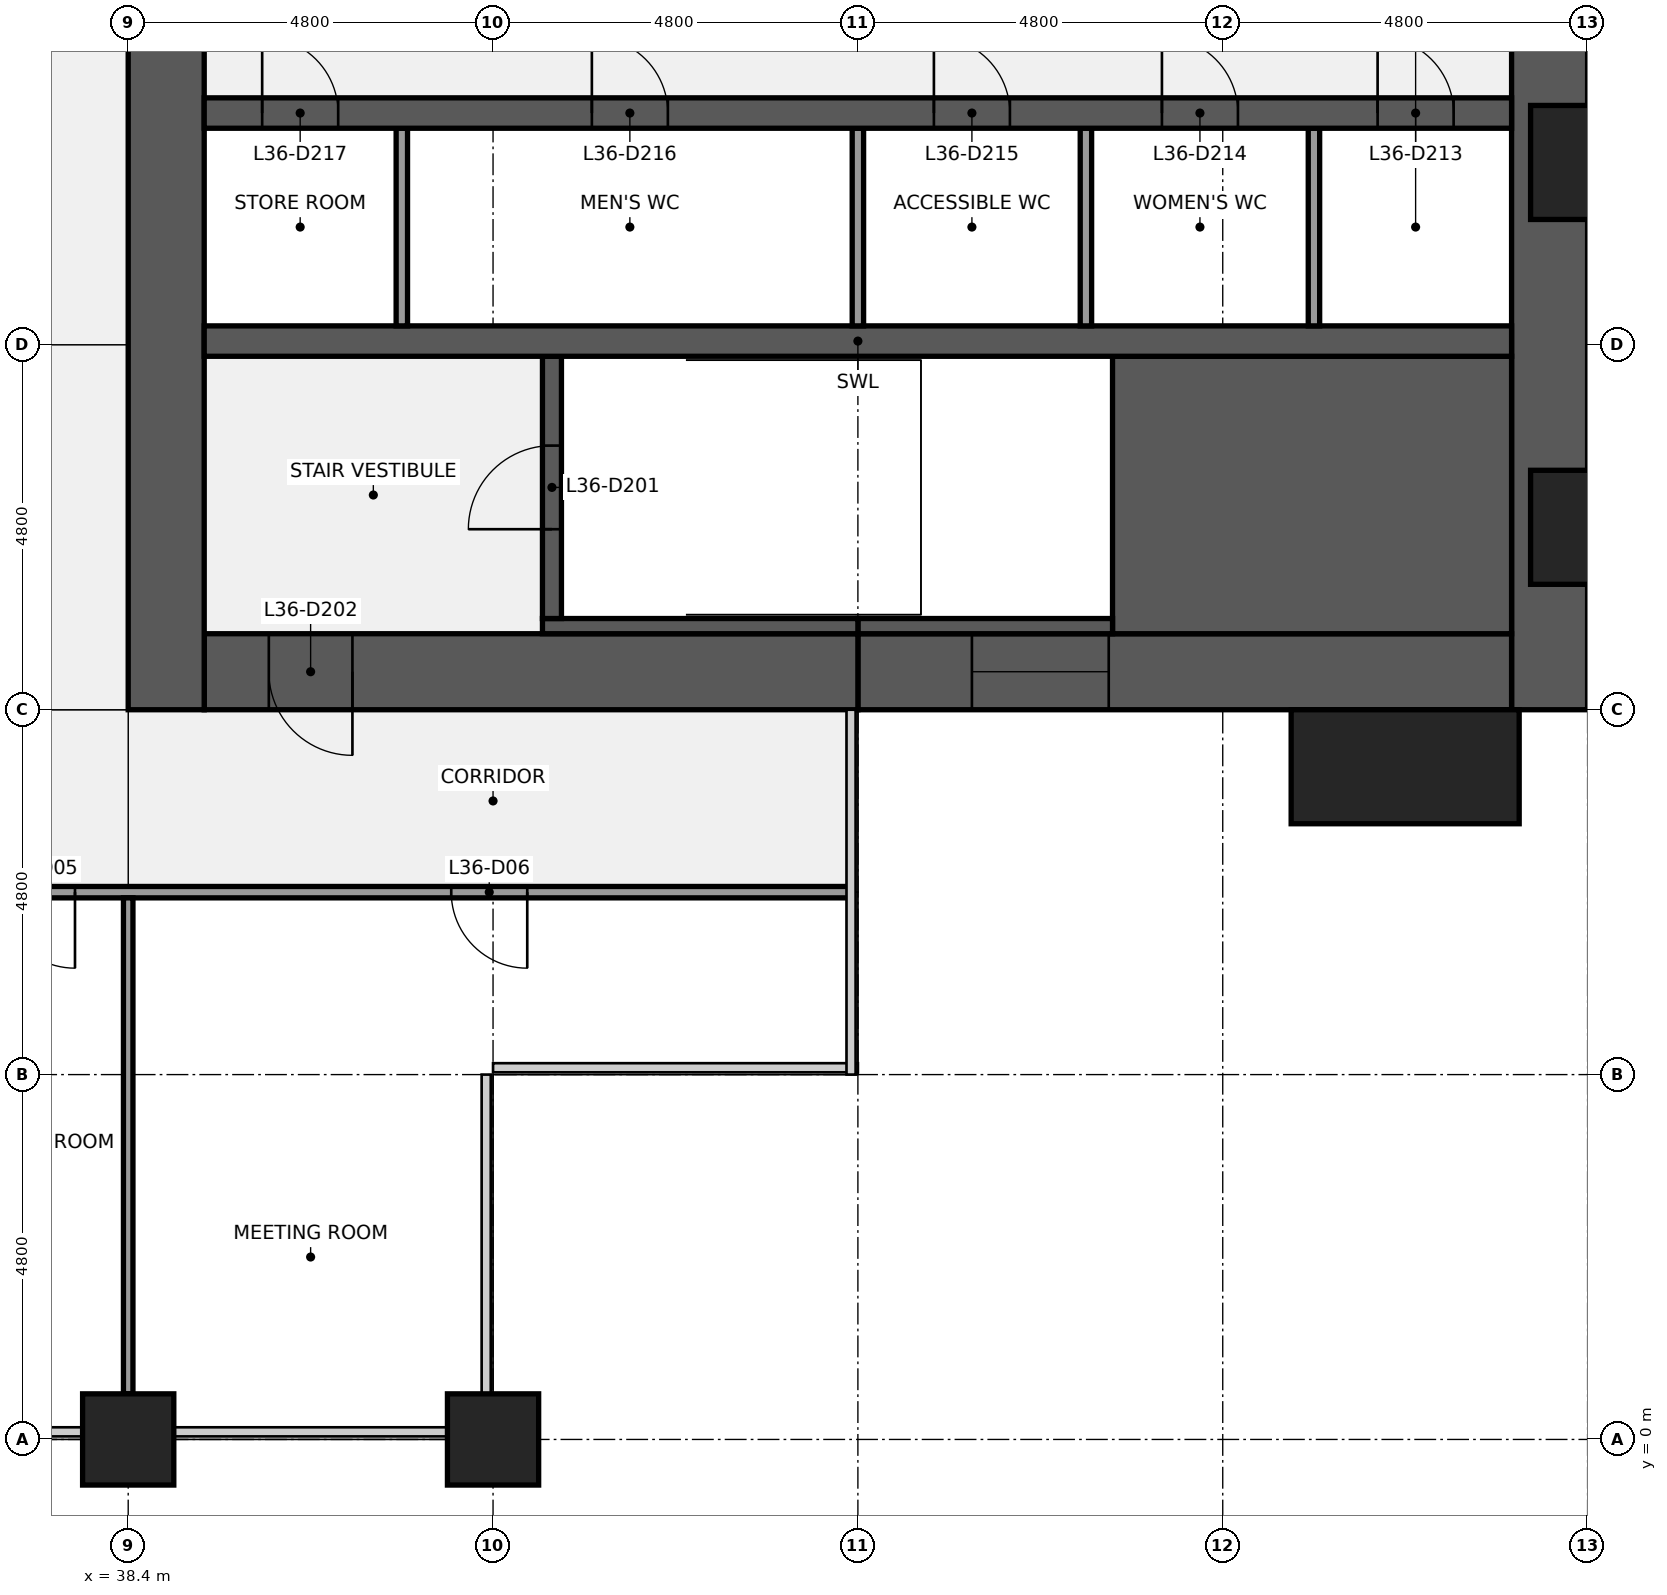
"""IFC4 building model, lengths in metres.
Left out: names, types, materials, properties, quantities, classifications, styles, units other than length and angle.
Written with IfcOpenShell. Run it as: python <this file> out.ifc"""

import sys

from ifc_helpers import new_model, si_unit, direction, frame, frame_2d, origin, origin_2d, place, context, subcontext, project, spatial, rectangle, extrude, element, fill, save


model = new_model("IFC4")
c1 = context("Model", 3, precision=1e-05, world=origin(), true_north=direction((0.0, 1.0)))
c2 = subcontext(c1, "Body", "Model", "MODEL_VIEW")
j1 = project(units=[si_unit("LENGTHUNIT", "METRE"), si_unit("PLANEANGLEUNIT", "RADIAN")], contexts=[c1])
p1 = place(None, origin())
s1 = spatial("IfcSite", under=j1, at=p1, CompositionType="ELEMENT")
p2 = place(p1, origin())
s2 = spatial("IfcBuilding", under=s1, at=p2, CompositionType="ELEMENT")
p3 = place(p2, frame((0.0, 0.0, 164.1)))
s3 = spatial("IfcBuildingStorey", under=s2, at=p3, CompositionType="ELEMENT", Elevation=164.1)
for number, where, z_axis, x_axis in (
    (1, (38.4, 0.0, 0.0), (0.0, 0.0, 1.0), (1.0, 0.0, 0.0)),
    (2, (43.2, 0.0, 0.0), (0.0, 0.0, 1.0), (1.0, 0.0, 0.0)),
):
    element("IfcColumn", number, at=place(p3, frame(where, z_axis=z_axis, x_axis=x_axis)), inside=s3, PredefinedType="COLUMN", context=c2, shape_type="SweptSolid", body=[
        extrude(rectangle(XDim=1.2, YDim=1.2, at=origin_2d()), origin(), (0.0, 0.0, 1.0), 4.0),
    ])
p4 = place(p3, frame((57.1, 38.4, 0.0), z_axis=(0.0, 0.0, 1.0), x_axis=(0.0, -1.0, 0.0)))
e3 = element("IfcWall", 3, at=p4, inside=s3, PredefinedType="SHEAR", context=c2, shape_type="SweptSolid", body=[
    extrude(rectangle(XDim=28.8, YDim=1.0, at=frame_2d((14.4, 0.0))), origin(), (0.0, 0.0, 1.0), 3.84),
])
p5 = place(p4, frame((18.45, 0.0, 0.9)))
e4 = element("IfcOpeningElement", 4, at=p5, cuts=e3, PredefinedType="OPENING", context=c2, shape_type="SweptSolid", body=[
    extrude(rectangle(XDim=1.5, YDim=1.5, at=frame_2d((0.75, 0.75))), frame((0.0, 0.51, 0.0), z_axis=(0.0, -1.0, 0.0), x_axis=(1.0, 0.0, 0.0)), (0.0, 0.0, 1.0), 1.02),
])
p6 = place(p4, frame((8.85, 0.0, 0.9)))
e5 = element("IfcOpeningElement", 5, at=p6, cuts=e3, PredefinedType="OPENING", context=c2, shape_type="SweptSolid", body=[
    extrude(rectangle(XDim=1.5, YDim=1.5, at=frame_2d((0.75, 0.75))), frame((0.0, 0.51, 0.0), z_axis=(0.0, -1.0, 0.0), x_axis=(1.0, 0.0, 0.0)), (0.0, 0.0, 1.0), 1.02),
])
p7 = place(p3, frame((56.6, 10.1, 0.0), z_axis=(0.0, 0.0, 1.0), x_axis=(-1.0, 0.0, 0.0)))
e6 = element("IfcWall", 6, at=p7, inside=s3, PredefinedType="SHEAR", context=c2, shape_type="SweptSolid", body=[
    extrude(rectangle(XDim=8.6, YDim=1.0, at=frame_2d((4.3, 0.0))), origin(), (0.0, 0.0, 1.0), 3.84),
])
p8 = place(p7, frame((5.3, 0.0, 0.9)))
e7 = element("IfcOpeningElement", 7, at=p8, cuts=e6, PredefinedType="OPENING", context=c2, shape_type="SweptSolid", body=[
    extrude(rectangle(XDim=1.8, YDim=1.5, at=frame_2d((0.9, 0.75))), frame((0.0, 0.51, 0.0), z_axis=(0.0, -1.0, 0.0), x_axis=(1.0, 0.0, 0.0)), (0.0, 0.0, 1.0), 1.02),
])
p9 = place(p3, frame((48.0, 10.1, 0.0), z_axis=(0.0, 0.0, 1.0), x_axis=(-1.0, 0.0, 0.0)))
e8 = element("IfcWall", 8, at=p9, inside=s3, PredefinedType="SHEAR", context=c2, shape_type="SweptSolid", body=[
    extrude(rectangle(XDim=8.6, YDim=1.0, at=frame_2d((4.3, 0.0))), origin(), (0.0, 0.0, 1.0), 3.84),
])
p10 = place(p9, frame((6.65, 0.0, 0.0)))
e9 = element("IfcOpeningElement", 9, at=p10, cuts=e8, PredefinedType="OPENING", context=c2, shape_type="SweptSolid", body=[
    extrude(rectangle(XDim=1.1, YDim=2.1, at=frame_2d((0.55, 1.05))), frame((0.0, 0.51, 0.0), z_axis=(0.0, -1.0, 0.0), x_axis=(1.0, 0.0, 0.0)), (0.0, 0.0, 1.0), 1.02),
])
p11 = place(p3, frame((38.9, 9.6, 0.0), z_axis=(0.0, 0.0, 1.0), x_axis=(0.0, 1.0, 0.0)))
e10 = element("IfcWall", 10, at=p11, inside=s3, PredefinedType="SHEAR", context=c2, shape_type="SweptSolid", body=[
    extrude(rectangle(XDim=28.8, YDim=1.0, at=frame_2d((14.4, 0.0))), origin(), (0.0, 0.0, 1.0), 3.84),
])
p12 = place(p11, frame((8.7, 0.0, 0.0)))
e11 = element("IfcOpeningElement", 11, at=p12, cuts=e10, PredefinedType="OPENING", context=c2, shape_type="SweptSolid", body=[
    extrude(rectangle(XDim=1.8, YDim=2.1, at=frame_2d((0.9, 1.05))), frame((0.0, 0.51, 0.0), z_axis=(0.0, -1.0, 0.0), x_axis=(1.0, 0.0, 0.0)), (0.0, 0.0, 1.0), 1.02),
])
p13 = place(p11, frame((18.3, 0.0, 0.0)))
e12 = element("IfcOpeningElement", 12, at=p13, cuts=e10, PredefinedType="OPENING", context=c2, shape_type="SweptSolid", body=[
    extrude(rectangle(XDim=1.8, YDim=2.1, at=frame_2d((0.9, 1.05))), frame((0.0, 0.51, 0.0), z_axis=(0.0, -1.0, 0.0), x_axis=(1.0, 0.0, 0.0)), (0.0, 0.0, 1.0), 1.02),
])
p14 = place(p3, frame((51.35, 12.425, 0.0), z_axis=(0.0, 0.0, 1.0), x_axis=(1.0, 0.0, 0.0)))
e13 = element("IfcWall", 13, at=p14, inside=s3, PredefinedType="SHEAR", context=c2, shape_type="SweptSolid", body=[
    extrude(rectangle(XDim=5.25, YDim=3.65, at=frame_2d((2.625, 0.0))), origin(), (0.0, 0.0, 1.0), 3.84),
])
p15 = place(p3, frame((48.0, 10.7, 0.0), z_axis=(0.0, 0.0, 1.0), x_axis=(1.0, 0.0, 0.0)))
e14 = element("IfcWall", 14, at=p15, inside=s3, PredefinedType="SHEAR", context=c2, shape_type="SweptSolid", body=[
    extrude(rectangle(XDim=3.35, YDim=0.2, at=frame_2d((1.675, 0.0))), origin(), (0.0, 0.0, 1.0), 3.84),
])
p16 = place(p3, frame((43.85, 10.7, 0.0), z_axis=(0.0, 0.0, 1.0), x_axis=(1.0, 0.0, 0.0)))
e15 = element("IfcWall", 15, at=p16, inside=s3, PredefinedType="SHEAR", context=c2, shape_type="SweptSolid", body=[
    extrude(rectangle(XDim=4.15, YDim=0.2, at=frame_2d((2.075, 0.0))), origin(), (0.0, 0.0, 1.0), 3.84),
])
p17 = place(p3, frame((43.975, 10.8, 0.0), z_axis=(0.0, 0.0, 1.0), x_axis=(0.0, 1.0, 0.0)))
e16 = element("IfcWall", 16, at=p17, inside=s3, PredefinedType="SHEAR", context=c2, shape_type="SweptSolid", body=[
    extrude(rectangle(XDim=3.45, YDim=0.25, at=frame_2d((1.725, 0.0))), origin(), (0.0, 0.0, 1.0), 3.84),
])
p18 = place(p17, frame((1.175, 0.0, 0.0)))
e17 = element("IfcOpeningElement", 17, at=p18, cuts=e16, PredefinedType="OPENING", context=c2, shape_type="SweptSolid", body=[
    extrude(rectangle(XDim=1.1, YDim=2.1, at=frame_2d((0.55, 1.05))), frame((0.0, 0.135, 0.0), z_axis=(0.0, -1.0, 0.0), x_axis=(1.0, 0.0, 0.0)), (0.0, 0.0, 1.0), 0.27),
])
p19 = place(p3, frame((39.4, 14.45, 0.0), z_axis=(0.0, 0.0, 1.0), x_axis=(1.0, 0.0, 0.0)))
e18 = element("IfcWall", 18, at=p19, inside=s3, PredefinedType="SHEAR", context=c2, shape_type="SweptSolid", body=[
    extrude(rectangle(XDim=17.2, YDim=0.4, at=frame_2d((8.6, 0.0))), origin(), (0.0, 0.0, 1.0), 3.84),
])
for number, where, z_axis, x_axis in (
    (19, (54.0, 14.65, 0.0), (0.0, 0.0, 1.0), (0.0, 1.0, 0.0)),
    (20, (51.0, 14.65, 0.0), (0.0, 0.0, 1.0), (0.0, 1.0, 0.0)),
    (21, (48.0, 14.65, 0.0), (0.0, 0.0, 1.0), (0.0, 1.0, 0.0)),
    (22, (42.0, 14.65, 0.0), (0.0, 0.0, 1.0), (0.0, 1.0, 0.0)),
):
    element("IfcWall", number, at=place(p3, frame(where, z_axis=z_axis, x_axis=x_axis)), inside=s3, PredefinedType="PARTITIONING", context=c2, shape_type="SweptSolid", body=[
        extrude(rectangle(XDim=2.6, YDim=0.15, at=frame_2d((1.3, 0.0))), origin(), (0.0, 0.0, 1.0), 3.84),
    ])
p20 = place(p3, frame((39.4, 17.45, 0.0), z_axis=(0.0, 0.0, 1.0), x_axis=(1.0, 0.0, 0.0)))
e23 = element("IfcWall", 23, at=p20, inside=s3, PredefinedType="SHEAR", context=c2, shape_type="SweptSolid", body=[
    extrude(rectangle(XDim=17.2, YDim=0.4, at=frame_2d((8.6, 0.0))), origin(), (0.0, 0.0, 1.0), 3.84),
])
p21 = place(p20, frame((15.438, 0.0, 0.0)))
e24 = element("IfcOpeningElement", 24, at=p21, cuts=e23, PredefinedType="OPENING", context=c2, shape_type="SweptSolid", body=[
    extrude(rectangle(XDim=1.0, YDim=2.1, at=frame_2d((0.5, 1.05))), frame((0.0, 0.21, 0.0), z_axis=(0.0, -1.0, 0.0), x_axis=(1.0, 0.0, 0.0)), (0.0, 0.0, 1.0), 0.42),
])
p22 = place(p20, frame((12.6, 0.0, 0.0)))
e25 = element("IfcOpeningElement", 25, at=p22, cuts=e23, PredefinedType="OPENING", context=c2, shape_type="SweptSolid", body=[
    extrude(rectangle(XDim=1.0, YDim=2.1, at=frame_2d((0.5, 1.05))), frame((0.0, 0.21, 0.0), z_axis=(0.0, -1.0, 0.0), x_axis=(1.0, 0.0, 0.0)), (0.0, 0.0, 1.0), 0.42),
])
p23 = place(p20, frame((9.6, 0.0, 0.0)))
e26 = element("IfcOpeningElement", 26, at=p23, cuts=e23, PredefinedType="OPENING", context=c2, shape_type="SweptSolid", body=[
    extrude(rectangle(XDim=1.0, YDim=2.1, at=frame_2d((0.5, 1.05))), frame((0.0, 0.21, 0.0), z_axis=(0.0, -1.0, 0.0), x_axis=(1.0, 0.0, 0.0)), (0.0, 0.0, 1.0), 0.42),
])
p24 = place(p20, frame((5.1, 0.0, 0.0)))
e27 = element("IfcOpeningElement", 27, at=p24, cuts=e23, PredefinedType="OPENING", context=c2, shape_type="SweptSolid", body=[
    extrude(rectangle(XDim=1.0, YDim=2.1, at=frame_2d((0.5, 1.05))), frame((0.0, 0.21, 0.0), z_axis=(0.0, -1.0, 0.0), x_axis=(1.0, 0.0, 0.0)), (0.0, 0.0, 1.0), 0.42),
])
p25 = place(p20, frame((0.762, 0.0, 0.0)))
e28 = element("IfcOpeningElement", 28, at=p25, cuts=e23, PredefinedType="OPENING", context=c2, shape_type="SweptSolid", body=[
    extrude(rectangle(XDim=1.0, YDim=2.1, at=frame_2d((0.5, 1.05))), frame((0.0, 0.21, 0.0), z_axis=(0.0, -1.0, 0.0), x_axis=(1.0, 0.0, 0.0)), (0.0, 0.0, 1.0), 0.42),
])
p26 = place(p3, frame((9.7, 7.2, 0.0), z_axis=(0.0, 0.0, 1.0), x_axis=(1.0, 0.0, 0.0)))
e29 = element("IfcWall", 29, at=p26, inside=s3, PredefinedType="PARTITIONING", context=c2, shape_type="SweptSolid", body=[
    extrude(rectangle(XDim=38.2, YDim=0.15, at=frame_2d((19.1, 0.0))), origin(), (0.0, 0.0, 1.0), 2.936),
])
p27 = place(p26, frame((4.25, 0.0, 0.0)))
e30 = element("IfcOpeningElement", 30, at=p27, cuts=e29, PredefinedType="OPENING", context=c2, shape_type="SweptSolid", body=[
    extrude(rectangle(XDim=1.0, YDim=2.1, at=frame_2d((0.5, 1.05))), frame((0.0, 0.085, 0.0), z_axis=(0.0, -1.0, 0.0), x_axis=(1.0, 0.0, 0.0)), (0.0, 0.0, 1.0), 0.17),
])
p28 = place(p26, frame((13.8, 0.0, 0.0)))
e31 = element("IfcOpeningElement", 31, at=p28, cuts=e29, PredefinedType="OPENING", context=c2, shape_type="SweptSolid", body=[
    extrude(rectangle(XDim=1.0, YDim=2.1, at=frame_2d((0.5, 1.05))), frame((0.0, 0.085, 0.0), z_axis=(0.0, -1.0, 0.0), x_axis=(1.0, 0.0, 0.0)), (0.0, 0.0, 1.0), 0.17),
])
p29 = place(p26, frame((19.8, 0.0, 0.0)))
e32 = element("IfcOpeningElement", 32, at=p29, cuts=e29, PredefinedType="OPENING", context=c2, shape_type="SweptSolid", body=[
    extrude(rectangle(XDim=1.0, YDim=2.1, at=frame_2d((0.5, 1.05))), frame((0.0, 0.085, 0.0), z_axis=(0.0, -1.0, 0.0), x_axis=(1.0, 0.0, 0.0)), (0.0, 0.0, 1.0), 0.17),
])
p30 = place(p26, frame((23.4, 0.0, 0.0)))
e33 = element("IfcOpeningElement", 33, at=p30, cuts=e29, PredefinedType="OPENING", context=c2, shape_type="SweptSolid", body=[
    extrude(rectangle(XDim=1.0, YDim=2.1, at=frame_2d((0.5, 1.05))), frame((0.0, 0.085, 0.0), z_axis=(0.0, -1.0, 0.0), x_axis=(1.0, 0.0, 0.0)), (0.0, 0.0, 1.0), 0.17),
])
p31 = place(p26, frame((27.0, 0.0, 0.0)))
e34 = element("IfcOpeningElement", 34, at=p31, cuts=e29, PredefinedType="OPENING", context=c2, shape_type="SweptSolid", body=[
    extrude(rectangle(XDim=1.0, YDim=2.1, at=frame_2d((0.5, 1.05))), frame((0.0, 0.085, 0.0), z_axis=(0.0, -1.0, 0.0), x_axis=(1.0, 0.0, 0.0)), (0.0, 0.0, 1.0), 0.17),
])
p32 = place(p26, frame((32.95, 0.0, 0.0)))
e35 = element("IfcOpeningElement", 35, at=p32, cuts=e29, PredefinedType="OPENING", context=c2, shape_type="SweptSolid", body=[
    extrude(rectangle(XDim=1.0, YDim=2.1, at=frame_2d((0.5, 1.05))), frame((0.0, 0.085, 0.0), z_axis=(0.0, -1.0, 0.0), x_axis=(1.0, 0.0, 0.0)), (0.0, 0.0, 1.0), 0.17),
])
p33 = place(p3, frame((38.4, 0.6, 0.0), z_axis=(0.0, 0.0, 1.0), x_axis=(0.0, 1.0, 0.0)))
e36 = element("IfcWall", 36, at=p33, inside=s3, PredefinedType="PARTITIONING", context=c2, shape_type="SweptSolid", body=[
    extrude(rectangle(XDim=6.525, YDim=0.125, at=frame_2d((3.262, 0.0))), origin(), (0.0, 0.0, 1.0), 2.936),
])
p34 = place(p3, frame((55.2, 8.85, 0.0), z_axis=(0.0, 0.0, 1.0), x_axis=(1.0, 0.0, 0.0)))
e37 = element("IfcColumn", 37, at=p34, inside=s3, PredefinedType="PILASTER", context=c2, shape_type="SweptSolid", body=[
    extrude(rectangle(XDim=3.0, YDim=1.5, at=origin_2d()), origin(), (0.0, 0.0, 1.0), 4.0),
])
for number, where, z_axis, x_axis in (
    (38, (38.4, -1.05, 0.0), (0.0, 0.0, 1.0), (1.0, 0.0, 0.0)),
    (39, (43.2, -1.05, 0.0), (0.0, 0.0, 1.0), (1.0, 0.0, 0.0)),
):
    element("IfcColumn", number, at=place(p3, frame(where, z_axis=z_axis, x_axis=x_axis)), inside=s3, PredefinedType="PILASTER", context=c2, shape_type="SweptSolid", body=[
        extrude(rectangle(XDim=3.6, YDim=0.9, at=origin_2d()), origin(), (0.0, 0.0, 1.0), 4.0),
    ])
p35 = place(p18, origin())
e40 = element("IfcDoor", 40, at=p35, inside=s3, OperationType="SINGLE_SWING_LEFT", PredefinedType="DOOR", context=c2, shape_type="SweptSolid", body=[
    extrude(rectangle(XDim=1.1, YDim=2.1, at=frame_2d((0.55, 1.05))), frame((0.0, 0.025, 0.0), z_axis=(0.0, -1.0, 0.0), x_axis=(1.0, 0.0, 0.0)), (0.0, 0.0, 1.0), 0.05),
])
fill(e17, e40)
p36 = place(p10, origin())
e41 = element("IfcDoor", 41, at=p36, inside=s3, OperationType="SINGLE_SWING_LEFT", PredefinedType="DOOR", context=c2, shape_type="SweptSolid", body=[
    extrude(rectangle(XDim=1.1, YDim=2.1, at=frame_2d((0.55, 1.05))), frame((0.0, 0.025, 0.0), z_axis=(0.0, -1.0, 0.0), x_axis=(1.0, 0.0, 0.0)), (0.0, 0.0, 1.0), 0.05),
])
fill(e9, e41)
p37 = place(p21, origin())
e42 = element("IfcDoor", 42, at=p37, inside=s3, OperationType="SINGLE_SWING_LEFT", PredefinedType="DOOR", context=c2, shape_type="SweptSolid", body=[
    extrude(rectangle(XDim=1.0, YDim=2.1, at=frame_2d((0.5, 1.05))), frame((0.0, 0.025, 0.0), z_axis=(0.0, -1.0, 0.0), x_axis=(1.0, 0.0, 0.0)), (0.0, 0.0, 1.0), 0.05),
])
fill(e24, e42)
p38 = place(p22, origin())
e43 = element("IfcDoor", 43, at=p38, inside=s3, OperationType="SINGLE_SWING_LEFT", PredefinedType="DOOR", context=c2, shape_type="SweptSolid", body=[
    extrude(rectangle(XDim=1.0, YDim=2.1, at=frame_2d((0.5, 1.05))), frame((0.0, 0.025, 0.0), z_axis=(0.0, -1.0, 0.0), x_axis=(1.0, 0.0, 0.0)), (0.0, 0.0, 1.0), 0.05),
])
fill(e25, e43)
p39 = place(p23, origin())
e44 = element("IfcDoor", 44, at=p39, inside=s3, OperationType="SINGLE_SWING_LEFT", PredefinedType="DOOR", context=c2, shape_type="SweptSolid", body=[
    extrude(rectangle(XDim=1.0, YDim=2.1, at=frame_2d((0.5, 1.05))), frame((0.0, 0.025, 0.0), z_axis=(0.0, -1.0, 0.0), x_axis=(1.0, 0.0, 0.0)), (0.0, 0.0, 1.0), 0.05),
])
fill(e26, e44)
p40 = place(p24, origin())
e45 = element("IfcDoor", 45, at=p40, inside=s3, OperationType="SINGLE_SWING_LEFT", PredefinedType="DOOR", context=c2, shape_type="SweptSolid", body=[
    extrude(rectangle(XDim=1.0, YDim=2.1, at=frame_2d((0.5, 1.05))), frame((0.0, 0.025, 0.0), z_axis=(0.0, -1.0, 0.0), x_axis=(1.0, 0.0, 0.0)), (0.0, 0.0, 1.0), 0.05),
])
fill(e27, e45)
p41 = place(p25, origin())
e46 = element("IfcDoor", 46, at=p41, inside=s3, OperationType="SINGLE_SWING_LEFT", PredefinedType="DOOR", context=c2, shape_type="SweptSolid", body=[
    extrude(rectangle(XDim=1.0, YDim=2.1, at=frame_2d((0.5, 1.05))), frame((0.0, 0.025, 0.0), z_axis=(0.0, -1.0, 0.0), x_axis=(1.0, 0.0, 0.0)), (0.0, 0.0, 1.0), 0.05),
])
fill(e28, e46)
p42 = place(p8, origin())
e47 = element("IfcWindow", 47, at=p42, inside=s3, PartitioningType="SINGLE_PANEL", PredefinedType="WINDOW", context=c2, shape_type="SweptSolid", body=[
    extrude(rectangle(XDim=1.8, YDim=1.5, at=frame_2d((0.9, 0.75))), frame((0.0, 0.03, 0.0), z_axis=(0.0, -1.0, 0.0), x_axis=(1.0, 0.0, 0.0)), (0.0, 0.0, 1.0), 0.06),
])
fill(e7, e47)
p43 = place(p31, origin())
e48 = element("IfcDoor", 48, at=p43, inside=s3, OperationType="SINGLE_SWING_RIGHT", PredefinedType="DOOR", context=c2, shape_type="SweptSolid", body=[
    extrude(rectangle(XDim=1.0, YDim=2.1, at=frame_2d((0.5, 1.05))), frame((0.0, 0.025, 0.0), z_axis=(0.0, -1.0, 0.0), x_axis=(1.0, 0.0, 0.0)), (0.0, 0.0, 1.0), 0.05),
])
fill(e34, e48)
p44 = place(p32, origin())
e49 = element("IfcDoor", 49, at=p44, inside=s3, OperationType="SINGLE_SWING_RIGHT", PredefinedType="DOOR", context=c2, shape_type="SweptSolid", body=[
    extrude(rectangle(XDim=1.0, YDim=2.1, at=frame_2d((0.5, 1.05))), frame((0.0, 0.025, 0.0), z_axis=(0.0, -1.0, 0.0), x_axis=(1.0, 0.0, 0.0)), (0.0, 0.0, 1.0), 0.05),
])
fill(e35, e49)
save(model, sys.argv[1])
